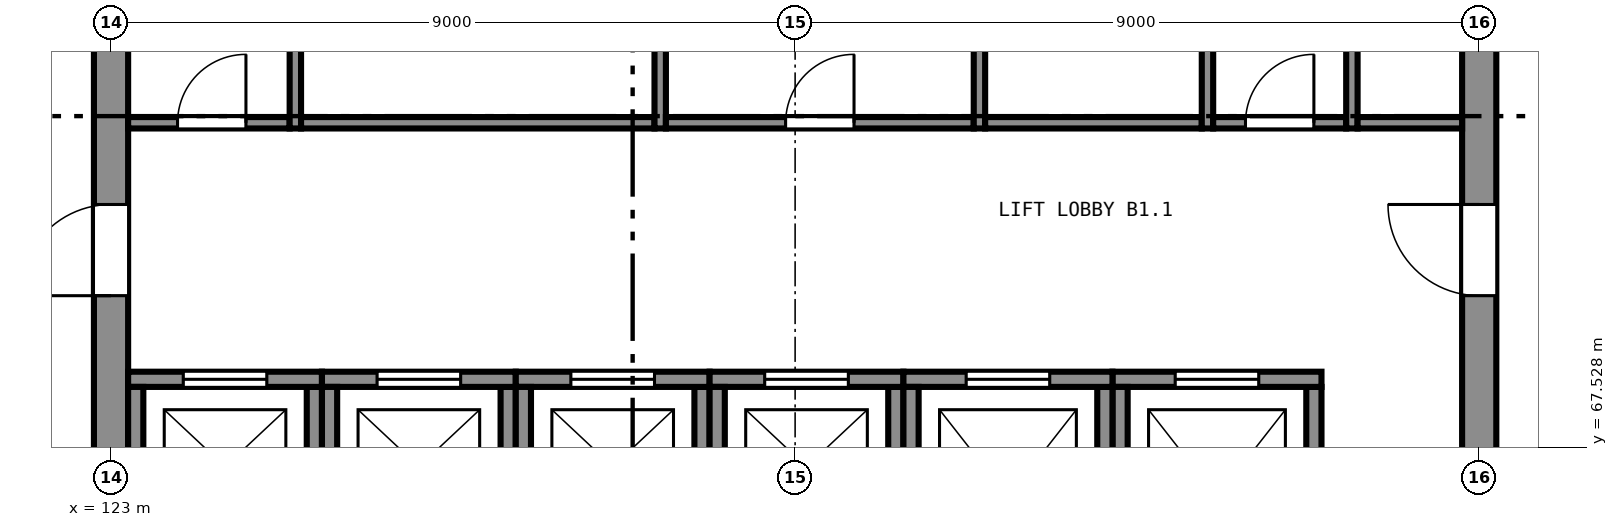
"""IFC4 building model, lengths in metres.
Left out: names, types, materials, properties, quantities, classifications, styles, units other than length and angle.
Written with IfcOpenShell. Run it as: python <this file> out.ifc"""

import sys

from ifc_helpers import new_model, si_unit, direction, frame, frame_2d, origin, place, context, subcontext, project, spatial, rectangle, extrude, element, fill, save


model = new_model("IFC4")
c1 = context("Model", 3, precision=1e-05, world=origin(), true_north=direction((0.0, 1.0)))
c2 = subcontext(c1, "Body", "Model", "MODEL_VIEW")
j1 = project(units=[si_unit("LENGTHUNIT", "METRE"), si_unit("PLANEANGLEUNIT", "RADIAN")], contexts=[c1])
p1 = place(None, origin())
s1 = spatial("IfcSite", under=j1, at=p1, CompositionType="ELEMENT")
p2 = place(p1, origin())
s2 = spatial("IfcBuilding", under=s1, at=p2, CompositionType="ELEMENT")
p3 = place(p2, frame((0.0, 0.0, -5.0)))
s3 = spatial("IfcBuildingStorey", under=s2, at=p3, CompositionType="ELEMENT", Elevation=-5.0)
p4 = place(p3, frame((141.0, 65.225, 0.0), z_axis=(0.0, 0.0, 1.0), x_axis=(0.0, 1.0, 0.0)))
e1 = element("IfcWall", 1, at=p4, inside=s3, PredefinedType="SHEAR", context=c2, shape_type="SweptSolid", body=[
    extrude(rectangle(XDim=17.55, YDim=0.45, at=frame_2d((8.775, 0.0))), origin(), (0.0, 0.0, 1.0), 5.0),
])
p5 = place(p4, frame((4.3, 0.0, 0.0)))
e2 = element("IfcOpeningElement", 2, at=p5, cuts=e1, PredefinedType="OPENING", context=c2, shape_type="SweptSolid", body=[
    extrude(rectangle(XDim=1.2, YDim=2.1, at=frame_2d((0.6, 1.05))), frame((0.0, 0.235, 0.0), z_axis=(0.0, -1.0, 0.0), x_axis=(1.0, 0.0, 0.0)), (0.0, 0.0, 1.0), 0.47),
])
p6 = place(p4, frame((12.05, 0.0, 0.0)))
e3 = element("IfcOpeningElement", 3, at=p6, cuts=e1, PredefinedType="OPENING", context=c2, shape_type="SweptSolid", body=[
    extrude(rectangle(XDim=1.2, YDim=2.1, at=frame_2d((0.6, 1.05))), frame((0.0, 0.235, 0.0), z_axis=(0.0, -1.0, 0.0), x_axis=(1.0, 0.0, 0.0)), (0.0, 0.0, 1.0), 0.47),
])
p7 = place(p3, frame((123.0, 82.775, 0.0), z_axis=(0.0, 0.0, 1.0), x_axis=(0.0, -1.0, 0.0)))
e4 = element("IfcWall", 4, at=p7, inside=s3, PredefinedType="SHEAR", context=c2, shape_type="SweptSolid", body=[
    extrude(rectangle(XDim=17.55, YDim=0.45, at=frame_2d((8.775, 0.0))), origin(), (0.0, 0.0, 1.0), 5.0),
])
p8 = place(p7, frame((12.05, 0.0, 0.0)))
e5 = element("IfcOpeningElement", 5, at=p8, cuts=e4, PredefinedType="OPENING", context=c2, shape_type="SweptSolid", body=[
    extrude(rectangle(XDim=1.2, YDim=2.1, at=frame_2d((0.6, 1.05))), frame((0.0, 0.235, 0.0), z_axis=(0.0, -1.0, 0.0), x_axis=(1.0, 0.0, 0.0)), (0.0, 0.0, 1.0), 0.47),
])
p9 = place(p7, frame((4.3, 0.0, 0.0)))
e6 = element("IfcOpeningElement", 6, at=p9, cuts=e4, PredefinedType="OPENING", context=c2, shape_type="SweptSolid", body=[
    extrude(rectangle(XDim=1.2, YDim=2.1, at=frame_2d((0.6, 1.05))), frame((0.0, 0.235, 0.0), z_axis=(0.0, -1.0, 0.0), x_axis=(1.0, 0.0, 0.0)), (0.0, 0.0, 1.0), 0.47),
])
p10 = place(p3, frame((125.675, 66.225, 0.0), z_axis=(0.0, 0.0, 1.0), x_axis=(0.0, 1.0, 0.0)))
e7 = element("IfcWall", 7, at=p10, inside=s3, PredefinedType="SHEAR", context=c2, shape_type="SweptSolid", body=[
    extrude(rectangle(XDim=2.1, YDim=0.2, at=frame_2d((1.05, 0.0))), origin(), (0.0, 0.0, 1.0), 5.0),
])
p11 = place(p3, frame((125.775, 68.425, 0.0), z_axis=(0.0, 0.0, 1.0), x_axis=(-1.0, 0.0, 0.0)))
e8 = element("IfcWall", 8, at=p11, inside=s3, PredefinedType="SHEAR", context=c2, shape_type="SweptSolid", body=[
    extrude(rectangle(XDim=2.55, YDim=0.2, at=frame_2d((1.275, 0.0))), origin(), (0.0, 0.0, 1.0), 5.0),
])
p12 = place(p11, frame((0.725, 0.0, 0.0)))
e9 = element("IfcOpeningElement", 9, at=p12, cuts=e8, PredefinedType="OPENING", context=c2, shape_type="SweptSolid", body=[
    extrude(rectangle(XDim=1.1, YDim=2.1, at=frame_2d((0.55, 1.05))), frame((0.0, 0.11, 0.0), z_axis=(0.0, -1.0, 0.0), x_axis=(1.0, 0.0, 0.0)), (0.0, 0.0, 1.0), 0.22),
])
for number, where, z_axis, x_axis in (
    (10, (123.325, 68.325, 0.0), (0.0, 0.0, 1.0), (0.0, -1.0, 0.0)),
    (11, (128.225, 66.225, 0.0), (0.0, 0.0, 1.0), (0.0, 1.0, 0.0)),
):
    element("IfcWall", number, at=place(p3, frame(where, z_axis=z_axis, x_axis=x_axis)), inside=s3, PredefinedType="SHEAR", context=c2, shape_type="SweptSolid", body=[
        extrude(rectangle(XDim=2.1, YDim=0.2, at=frame_2d((1.05, 0.0))), origin(), (0.0, 0.0, 1.0), 5.0),
    ])
p13 = place(p3, frame((128.325, 68.425, 0.0), z_axis=(0.0, 0.0, 1.0), x_axis=(-1.0, 0.0, 0.0)))
e12 = element("IfcWall", 12, at=p13, inside=s3, PredefinedType="SHEAR", context=c2, shape_type="SweptSolid", body=[
    extrude(rectangle(XDim=2.55, YDim=0.2, at=frame_2d((1.275, 0.0))), origin(), (0.0, 0.0, 1.0), 5.0),
])
p14 = place(p13, frame((0.725, 0.0, 0.0)))
e13 = element("IfcOpeningElement", 13, at=p14, cuts=e12, PredefinedType="OPENING", context=c2, shape_type="SweptSolid", body=[
    extrude(rectangle(XDim=1.1, YDim=2.1, at=frame_2d((0.55, 1.05))), frame((0.0, 0.11, 0.0), z_axis=(0.0, -1.0, 0.0), x_axis=(1.0, 0.0, 0.0)), (0.0, 0.0, 1.0), 0.22),
])
for number, where, z_axis, x_axis in (
    (14, (125.875, 68.325, 0.0), (0.0, 0.0, 1.0), (0.0, -1.0, 0.0)),
    (15, (130.775, 66.225, 0.0), (0.0, 0.0, 1.0), (0.0, 1.0, 0.0)),
):
    element("IfcWall", number, at=place(p3, frame(where, z_axis=z_axis, x_axis=x_axis)), inside=s3, PredefinedType="SHEAR", context=c2, shape_type="SweptSolid", body=[
        extrude(rectangle(XDim=2.1, YDim=0.2, at=frame_2d((1.05, 0.0))), origin(), (0.0, 0.0, 1.0), 5.0),
    ])
p15 = place(p3, frame((130.875, 68.425, 0.0), z_axis=(0.0, 0.0, 1.0), x_axis=(-1.0, 0.0, 0.0)))
e16 = element("IfcWall", 16, at=p15, inside=s3, PredefinedType="SHEAR", context=c2, shape_type="SweptSolid", body=[
    extrude(rectangle(XDim=2.55, YDim=0.2, at=frame_2d((1.275, 0.0))), origin(), (0.0, 0.0, 1.0), 5.0),
])
p16 = place(p15, frame((0.725, 0.0, 0.0)))
e17 = element("IfcOpeningElement", 17, at=p16, cuts=e16, PredefinedType="OPENING", context=c2, shape_type="SweptSolid", body=[
    extrude(rectangle(XDim=1.1, YDim=2.1, at=frame_2d((0.55, 1.05))), frame((0.0, 0.11, 0.0), z_axis=(0.0, -1.0, 0.0), x_axis=(1.0, 0.0, 0.0)), (0.0, 0.0, 1.0), 0.22),
])
for number, where, z_axis, x_axis in (
    (18, (128.425, 68.325, 0.0), (0.0, 0.0, 1.0), (0.0, -1.0, 0.0)),
    (19, (133.325, 66.225, 0.0), (0.0, 0.0, 1.0), (0.0, 1.0, 0.0)),
):
    element("IfcWall", number, at=place(p3, frame(where, z_axis=z_axis, x_axis=x_axis)), inside=s3, PredefinedType="SHEAR", context=c2, shape_type="SweptSolid", body=[
        extrude(rectangle(XDim=2.1, YDim=0.2, at=frame_2d((1.05, 0.0))), origin(), (0.0, 0.0, 1.0), 5.0),
    ])
p17 = place(p3, frame((133.425, 68.425, 0.0), z_axis=(0.0, 0.0, 1.0), x_axis=(-1.0, 0.0, 0.0)))
e20 = element("IfcWall", 20, at=p17, inside=s3, PredefinedType="SHEAR", context=c2, shape_type="SweptSolid", body=[
    extrude(rectangle(XDim=2.55, YDim=0.2, at=frame_2d((1.275, 0.0))), origin(), (0.0, 0.0, 1.0), 5.0),
])
p18 = place(p17, frame((0.725, 0.0, 0.0)))
e21 = element("IfcOpeningElement", 21, at=p18, cuts=e20, PredefinedType="OPENING", context=c2, shape_type="SweptSolid", body=[
    extrude(rectangle(XDim=1.1, YDim=2.1, at=frame_2d((0.55, 1.05))), frame((0.0, 0.11, 0.0), z_axis=(0.0, -1.0, 0.0), x_axis=(1.0, 0.0, 0.0)), (0.0, 0.0, 1.0), 0.22),
])
p19 = place(p3, frame((130.975, 68.325, 0.0), z_axis=(0.0, 0.0, 1.0), x_axis=(0.0, -1.0, 0.0)))
e22 = element("IfcWall", 22, at=p19, inside=s3, PredefinedType="SHEAR", context=c2, shape_type="SweptSolid", body=[
    extrude(rectangle(XDim=2.1, YDim=0.2, at=frame_2d((1.05, 0.0))), origin(), (0.0, 0.0, 1.0), 5.0),
])
p20 = place(p3, frame((136.075, 65.425, 0.0), z_axis=(0.0, 0.0, 1.0), x_axis=(0.0, 1.0, 0.0)))
e23 = element("IfcWall", 23, at=p20, inside=s3, PredefinedType="SHEAR", context=c2, shape_type="SweptSolid", body=[
    extrude(rectangle(XDim=2.9, YDim=0.2, at=frame_2d((1.45, 0.0))), origin(), (0.0, 0.0, 1.0), 5.0),
])
p21 = place(p3, frame((136.175, 68.425, 0.0), z_axis=(0.0, 0.0, 1.0), x_axis=(-1.0, 0.0, 0.0)))
e24 = element("IfcWall", 24, at=p21, inside=s3, PredefinedType="SHEAR", context=c2, shape_type="SweptSolid", body=[
    extrude(rectangle(XDim=2.75, YDim=0.2, at=frame_2d((1.375, 0.0))), origin(), (0.0, 0.0, 1.0), 5.0),
])
p22 = place(p21, frame((0.825, 0.0, 0.0)))
e25 = element("IfcOpeningElement", 25, at=p22, cuts=e24, PredefinedType="OPENING", context=c2, shape_type="SweptSolid", body=[
    extrude(rectangle(XDim=1.1, YDim=2.1, at=frame_2d((0.55, 1.05))), frame((0.0, 0.11, 0.0), z_axis=(0.0, -1.0, 0.0), x_axis=(1.0, 0.0, 0.0)), (0.0, 0.0, 1.0), 0.22),
])
for number, where, z_axis, x_axis in (
    (26, (133.525, 68.325, 0.0), (0.0, 0.0, 1.0), (0.0, -1.0, 0.0)),
    (27, (138.825, 65.425, 0.0), (0.0, 0.0, 1.0), (0.0, 1.0, 0.0)),
):
    element("IfcWall", number, at=place(p3, frame(where, z_axis=z_axis, x_axis=x_axis)), inside=s3, PredefinedType="SHEAR", context=c2, shape_type="SweptSolid", body=[
        extrude(rectangle(XDim=2.9, YDim=0.2, at=frame_2d((1.45, 0.0))), origin(), (0.0, 0.0, 1.0), 5.0),
    ])
p23 = place(p3, frame((138.925, 68.425, 0.0), z_axis=(0.0, 0.0, 1.0), x_axis=(-1.0, 0.0, 0.0)))
e28 = element("IfcWall", 28, at=p23, inside=s3, PredefinedType="SHEAR", context=c2, shape_type="SweptSolid", body=[
    extrude(rectangle(XDim=2.75, YDim=0.2, at=frame_2d((1.375, 0.0))), origin(), (0.0, 0.0, 1.0), 5.0),
])
p24 = place(p23, frame((0.825, 0.0, 0.0)))
e29 = element("IfcOpeningElement", 29, at=p24, cuts=e28, PredefinedType="OPENING", context=c2, shape_type="SweptSolid", body=[
    extrude(rectangle(XDim=1.1, YDim=2.1, at=frame_2d((0.55, 1.05))), frame((0.0, 0.11, 0.0), z_axis=(0.0, -1.0, 0.0), x_axis=(1.0, 0.0, 0.0)), (0.0, 0.0, 1.0), 0.22),
])
p25 = place(p3, frame((136.275, 68.325, 0.0), z_axis=(0.0, 0.0, 1.0), x_axis=(0.0, -1.0, 0.0)))
e30 = element("IfcWall", 30, at=p25, inside=s3, PredefinedType="SHEAR", context=c2, shape_type="SweptSolid", body=[
    extrude(rectangle(XDim=2.9, YDim=0.2, at=frame_2d((1.45, 0.0))), origin(), (0.0, 0.0, 1.0), 5.0),
])
p26 = place(p3, frame((125.425, 71.725, 0.0), z_axis=(0.0, 0.0, 1.0), x_axis=(0.0, 1.0, 0.0)))
e31 = element("IfcWall", 31, at=p26, inside=s3, PredefinedType="PARTITIONING", context=c2, shape_type="SweptSolid", body=[
    extrude(rectangle(XDim=4.55, YDim=0.15, at=frame_2d((2.275, 0.0))), origin(), (0.0, 0.0, 1.0), 4.58),
])
p27 = place(p3, frame((123.225, 71.8, 0.0), z_axis=(0.0, 0.0, 1.0), x_axis=(1.0, 0.0, 0.0)))
e32 = element("IfcWall", 32, at=p27, inside=s3, PredefinedType="PARTITIONING", context=c2, shape_type="SweptSolid", body=[
    extrude(rectangle(XDim=2.125, YDim=0.15, at=frame_2d((1.062, 0.0))), origin(), (0.0, 0.0, 1.0), 4.58),
])
p28 = place(p27, frame((0.65, 0.0, 0.0)))
e33 = element("IfcOpeningElement", 33, at=p28, cuts=e32, PredefinedType="OPENING", context=c2, shape_type="SweptSolid", body=[
    extrude(rectangle(XDim=0.9, YDim=2.1, at=frame_2d((0.45, 1.05))), frame((0.0, 0.085, 0.0), z_axis=(0.0, -1.0, 0.0), x_axis=(1.0, 0.0, 0.0)), (0.0, 0.0, 1.0), 0.17),
])
p29 = place(p3, frame((130.225, 71.725, 0.0), z_axis=(0.0, 0.0, 1.0), x_axis=(0.0, 1.0, 0.0)))
e34 = element("IfcWall", 34, at=p29, inside=s3, PredefinedType="PARTITIONING", context=c2, shape_type="SweptSolid", body=[
    extrude(rectangle(XDim=4.55, YDim=0.15, at=frame_2d((2.275, 0.0))), origin(), (0.0, 0.0, 1.0), 4.58),
])
p30 = place(p3, frame((125.5, 71.8, 0.0), z_axis=(0.0, 0.0, 1.0), x_axis=(1.0, 0.0, 0.0)))
e35 = element("IfcWall", 35, at=p30, inside=s3, PredefinedType="PARTITIONING", context=c2, shape_type="SweptSolid", body=[
    extrude(rectangle(XDim=4.65, YDim=0.15, at=frame_2d((2.325, 0.0))), origin(), (0.0, 0.0, 1.0), 4.58),
])
p31 = place(p3, frame((134.425, 71.725, 0.0), z_axis=(0.0, 0.0, 1.0), x_axis=(0.0, 1.0, 0.0)))
e36 = element("IfcWall", 36, at=p31, inside=s3, PredefinedType="PARTITIONING", context=c2, shape_type="SweptSolid", body=[
    extrude(rectangle(XDim=4.55, YDim=0.15, at=frame_2d((2.275, 0.0))), origin(), (0.0, 0.0, 1.0), 4.58),
])
p32 = place(p3, frame((130.3, 71.8, 0.0), z_axis=(0.0, 0.0, 1.0), x_axis=(1.0, 0.0, 0.0)))
e37 = element("IfcWall", 37, at=p32, inside=s3, PredefinedType="PARTITIONING", context=c2, shape_type="SweptSolid", body=[
    extrude(rectangle(XDim=4.05, YDim=0.15, at=frame_2d((2.025, 0.0))), origin(), (0.0, 0.0, 1.0), 4.58),
])
p33 = place(p32, frame((1.575, 0.0, 0.0)))
e38 = element("IfcOpeningElement", 38, at=p33, cuts=e37, PredefinedType="OPENING", context=c2, shape_type="SweptSolid", body=[
    extrude(rectangle(XDim=0.9, YDim=2.1, at=frame_2d((0.45, 1.05))), frame((0.0, 0.085, 0.0), z_axis=(0.0, -1.0, 0.0), x_axis=(1.0, 0.0, 0.0)), (0.0, 0.0, 1.0), 0.17),
])
p34 = place(p3, frame((137.425, 71.725, 0.0), z_axis=(0.0, 0.0, 1.0), x_axis=(0.0, 1.0, 0.0)))
e39 = element("IfcWall", 39, at=p34, inside=s3, PredefinedType="PARTITIONING", context=c2, shape_type="SweptSolid", body=[
    extrude(rectangle(XDim=4.55, YDim=0.15, at=frame_2d((2.275, 0.0))), origin(), (0.0, 0.0, 1.0), 4.58),
])
p35 = place(p3, frame((134.5, 71.8, 0.0), z_axis=(0.0, 0.0, 1.0), x_axis=(1.0, 0.0, 0.0)))
e40 = element("IfcWall", 40, at=p35, inside=s3, PredefinedType="PARTITIONING", context=c2, shape_type="SweptSolid", body=[
    extrude(rectangle(XDim=2.85, YDim=0.15, at=frame_2d((1.425, 0.0))), origin(), (0.0, 0.0, 1.0), 4.58),
])
p36 = place(p3, frame((139.325, 71.725, 0.0), z_axis=(0.0, 0.0, 1.0), x_axis=(0.0, 1.0, 0.0)))
e41 = element("IfcWall", 41, at=p36, inside=s3, PredefinedType="PARTITIONING", context=c2, shape_type="SweptSolid", body=[
    extrude(rectangle(XDim=4.55, YDim=0.15, at=frame_2d((2.275, 0.0))), origin(), (0.0, 0.0, 1.0), 4.58),
])
p37 = place(p3, frame((137.5, 71.8, 0.0), z_axis=(0.0, 0.0, 1.0), x_axis=(1.0, 0.0, 0.0)))
e42 = element("IfcWall", 42, at=p37, inside=s3, PredefinedType="PARTITIONING", context=c2, shape_type="SweptSolid", body=[
    extrude(rectangle(XDim=1.75, YDim=0.15, at=frame_2d((0.875, 0.0))), origin(), (0.0, 0.0, 1.0), 4.58),
])
p38 = place(p37, frame((0.425, 0.0, 0.0)))
e43 = element("IfcOpeningElement", 43, at=p38, cuts=e42, PredefinedType="OPENING", context=c2, shape_type="SweptSolid", body=[
    extrude(rectangle(XDim=0.9, YDim=2.1, at=frame_2d((0.45, 1.05))), frame((0.0, 0.085, 0.0), z_axis=(0.0, -1.0, 0.0), x_axis=(1.0, 0.0, 0.0)), (0.0, 0.0, 1.0), 0.17),
])
p39 = place(p3, frame((139.4, 71.8, 0.0), z_axis=(0.0, 0.0, 1.0), x_axis=(1.0, 0.0, 0.0)))
e44 = element("IfcWall", 44, at=p39, inside=s3, PredefinedType="PARTITIONING", context=c2, shape_type="SweptSolid", body=[
    extrude(rectangle(XDim=1.375, YDim=0.15, at=frame_2d((0.688, 0.0))), origin(), (0.0, 0.0, 1.0), 4.58),
])
p40 = place(p12, origin())
e45 = element("IfcDoor", 45, at=p40, inside=s3, OperationType="SLIDING_TO_LEFT", PredefinedType="DOOR", context=c2, shape_type="SweptSolid", body=[
    extrude(rectangle(XDim=1.1, YDim=2.1, at=frame_2d((0.55, 1.05))), frame((0.0, 0.025, 0.0), z_axis=(0.0, -1.0, 0.0), x_axis=(1.0, 0.0, 0.0)), (0.0, 0.0, 1.0), 0.05),
])
fill(e9, e45)
p41 = place(p14, origin())
e46 = element("IfcDoor", 46, at=p41, inside=s3, OperationType="SLIDING_TO_LEFT", PredefinedType="DOOR", context=c2, shape_type="SweptSolid", body=[
    extrude(rectangle(XDim=1.1, YDim=2.1, at=frame_2d((0.55, 1.05))), frame((0.0, 0.025, 0.0), z_axis=(0.0, -1.0, 0.0), x_axis=(1.0, 0.0, 0.0)), (0.0, 0.0, 1.0), 0.05),
])
fill(e13, e46)
p42 = place(p16, origin())
e47 = element("IfcDoor", 47, at=p42, inside=s3, OperationType="SLIDING_TO_LEFT", PredefinedType="DOOR", context=c2, shape_type="SweptSolid", body=[
    extrude(rectangle(XDim=1.1, YDim=2.1, at=frame_2d((0.55, 1.05))), frame((0.0, 0.025, 0.0), z_axis=(0.0, -1.0, 0.0), x_axis=(1.0, 0.0, 0.0)), (0.0, 0.0, 1.0), 0.05),
])
fill(e17, e47)
p43 = place(p18, origin())
e48 = element("IfcDoor", 48, at=p43, inside=s3, OperationType="SLIDING_TO_LEFT", PredefinedType="DOOR", context=c2, shape_type="SweptSolid", body=[
    extrude(rectangle(XDim=1.1, YDim=2.1, at=frame_2d((0.55, 1.05))), frame((0.0, 0.025, 0.0), z_axis=(0.0, -1.0, 0.0), x_axis=(1.0, 0.0, 0.0)), (0.0, 0.0, 1.0), 0.05),
])
fill(e21, e48)
p44 = place(p22, origin())
e49 = element("IfcDoor", 49, at=p44, inside=s3, OperationType="SLIDING_TO_LEFT", PredefinedType="DOOR", context=c2, shape_type="SweptSolid", body=[
    extrude(rectangle(XDim=1.1, YDim=2.1, at=frame_2d((0.55, 1.05))), frame((0.0, 0.025, 0.0), z_axis=(0.0, -1.0, 0.0), x_axis=(1.0, 0.0, 0.0)), (0.0, 0.0, 1.0), 0.05),
])
fill(e25, e49)
p45 = place(p24, origin())
e50 = element("IfcDoor", 50, at=p45, inside=s3, OperationType="SLIDING_TO_LEFT", PredefinedType="DOOR", context=c2, shape_type="SweptSolid", body=[
    extrude(rectangle(XDim=1.1, YDim=2.1, at=frame_2d((0.55, 1.05))), frame((0.0, 0.025, 0.0), z_axis=(0.0, -1.0, 0.0), x_axis=(1.0, 0.0, 0.0)), (0.0, 0.0, 1.0), 0.05),
])
fill(e29, e50)
p46 = place(p8, frame((1.2, 0.0, 0.0), z_axis=(0.0, 0.0, 1.0), x_axis=(-1.0, 0.0, 0.0)))
e51 = element("IfcDoor", 51, at=p46, inside=s3, OperationType="SINGLE_SWING_RIGHT", PredefinedType="DOOR", context=c2, shape_type="SweptSolid", body=[
    extrude(rectangle(XDim=1.2, YDim=2.1, at=frame_2d((0.6, 1.05))), frame((0.0, 0.025, 0.0), z_axis=(0.0, -1.0, 0.0), x_axis=(1.0, 0.0, 0.0)), (0.0, 0.0, 1.0), 0.05),
])
fill(e5, e51)
p47 = place(p5, origin())
e52 = element("IfcDoor", 52, at=p47, inside=s3, OperationType="SINGLE_SWING_LEFT", PredefinedType="DOOR", context=c2, shape_type="SweptSolid", body=[
    extrude(rectangle(XDim=1.2, YDim=2.1, at=frame_2d((0.6, 1.05))), frame((0.0, 0.025, 0.0), z_axis=(0.0, -1.0, 0.0), x_axis=(1.0, 0.0, 0.0)), (0.0, 0.0, 1.0), 0.05),
])
fill(e2, e52)
p48 = place(p28, origin())
e53 = element("IfcDoor", 53, at=p48, inside=s3, OperationType="SINGLE_SWING_LEFT", PredefinedType="DOOR", context=c2, shape_type="SweptSolid", body=[
    extrude(rectangle(XDim=0.9, YDim=2.1, at=frame_2d((0.45, 1.05))), frame((0.0, 0.025, 0.0), z_axis=(0.0, -1.0, 0.0), x_axis=(1.0, 0.0, 0.0)), (0.0, 0.0, 1.0), 0.05),
])
fill(e33, e53)
p49 = place(p33, origin())
e54 = element("IfcDoor", 54, at=p49, inside=s3, OperationType="SINGLE_SWING_LEFT", PredefinedType="DOOR", context=c2, shape_type="SweptSolid", body=[
    extrude(rectangle(XDim=0.9, YDim=2.1, at=frame_2d((0.45, 1.05))), frame((0.0, 0.025, 0.0), z_axis=(0.0, -1.0, 0.0), x_axis=(1.0, 0.0, 0.0)), (0.0, 0.0, 1.0), 0.05),
])
fill(e38, e54)
p50 = place(p38, origin())
e55 = element("IfcDoor", 55, at=p50, inside=s3, OperationType="SINGLE_SWING_LEFT", PredefinedType="DOOR", context=c2, shape_type="SweptSolid", body=[
    extrude(rectangle(XDim=0.9, YDim=2.1, at=frame_2d((0.45, 1.05))), frame((0.0, 0.025, 0.0), z_axis=(0.0, -1.0, 0.0), x_axis=(1.0, 0.0, 0.0)), (0.0, 0.0, 1.0), 0.05),
])
fill(e43, e55)
save(model, sys.argv[1])
